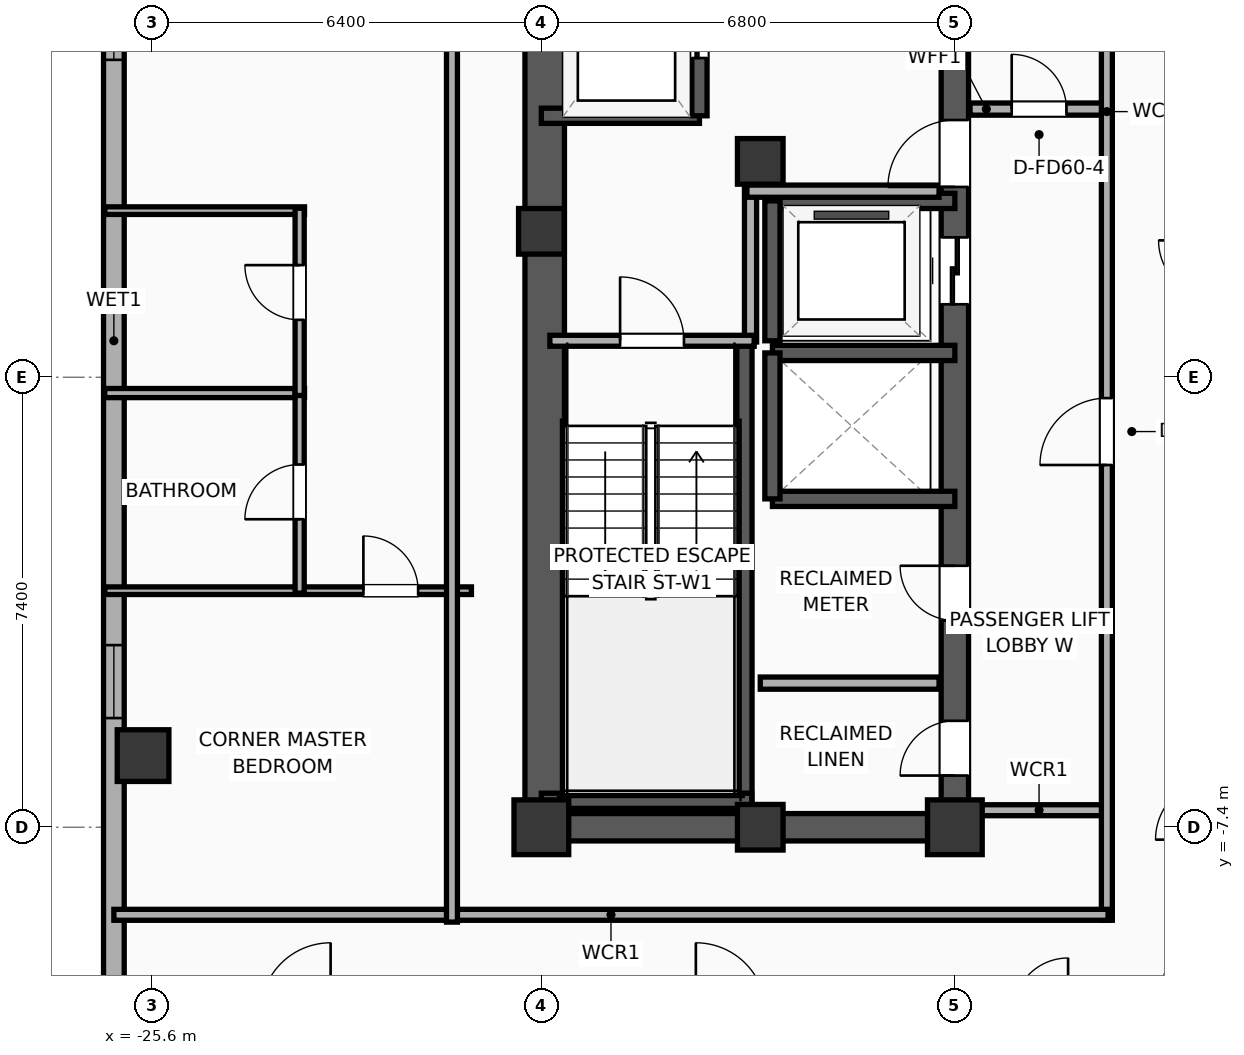
"""IFC4 building model, lengths in metres.
Left out: names, types, materials, properties, quantities, classifications, styles, units other than length and angle.
Written with IfcOpenShell. Run it as: python <this file> out.ifc"""

import sys

from ifc_helpers import new_model, si_unit, direction, frame, frame_2d, origin, origin_2d, place, context, subcontext, project, spatial, rectangle, hollow_rectangle, extrude, element, fill, save


model = new_model("IFC4")
c1 = context("Model", 3, precision=1e-05, world=origin(), true_north=direction((0.0, 1.0)))
c2 = subcontext(c1, "Body", "Model", "MODEL_VIEW")
j1 = project(units=[si_unit("LENGTHUNIT", "METRE"), si_unit("PLANEANGLEUNIT", "RADIAN")], contexts=[c1])
p1 = place(None, origin())
s1 = spatial("IfcSite", under=j1, at=p1, CompositionType="ELEMENT")
p2 = place(p1, origin())
s2 = spatial("IfcBuilding", under=s1, at=p2, CompositionType="ELEMENT")
p3 = place(p2, frame((0.0, 0.0, 204.1)))
s3 = spatial("IfcBuildingStorey", under=s2, at=p3, CompositionType="ELEMENT", Elevation=204.1)
p4 = place(p3, frame((-19.2, -7.4, 0.0), z_axis=(0.0, 0.0, 1.0), x_axis=(1.0, 0.0, 0.0)))
e1 = element("IfcColumn", 1, at=p4, inside=s3, PredefinedType="COLUMN", context=c2, shape_type="SweptSolid", body=[
    extrude(rectangle(XDim=0.9, YDim=0.9, at=origin_2d()), origin(), (0.0, 0.0, 1.0), 3.9),
])
for number, where, z_axis, x_axis in (
    (2, (-19.2, 2.4, 0.0), (0.0, 0.0, 1.0), (1.0, 0.0, 0.0)),
    (3, (-15.6, -7.4, 0.0), (0.0, 0.0, 1.0), (1.0, 0.0, 0.0)),
):
    element("IfcColumn", number, at=place(p3, frame(where, z_axis=z_axis, x_axis=x_axis)), inside=s3, PredefinedType="COLUMN", context=c2, shape_type="SweptSolid", body=[
        extrude(rectangle(XDim=0.75, YDim=0.75, at=origin_2d()), origin(), (0.0, 0.0, 1.0), 3.9),
    ])
p5 = place(p3, frame((-12.4, -7.4, 0.0), z_axis=(0.0, 0.0, 1.0), x_axis=(1.0, 0.0, 0.0)))
e4 = element("IfcColumn", 4, at=p5, inside=s3, PredefinedType="COLUMN", context=c2, shape_type="SweptSolid", body=[
    extrude(rectangle(XDim=0.9, YDim=0.9, at=origin_2d()), origin(), (0.0, 0.0, 1.0), 3.9),
])
p6 = place(p3, frame((-15.6, 3.55, 0.0), z_axis=(0.0, 0.0, 1.0), x_axis=(1.0, 0.0, 0.0)))
e5 = element("IfcColumn", 5, at=p6, inside=s3, PredefinedType="COLUMN", context=c2, shape_type="SweptSolid", body=[
    extrude(rectangle(XDim=0.75, YDim=0.75, at=origin_2d()), origin(), (0.0, 0.0, 1.0), 3.9),
])
p7 = place(p3, frame((-19.425, -7.4, 0.0), z_axis=(0.0, 0.0, 1.0), x_axis=(1.0, 0.0, 0.0)))
e6 = element("IfcWall", 6, at=p7, inside=s3, PredefinedType="SHEAR", context=c2, shape_type="SweptSolid", body=[
    extrude(rectangle(XDim=7.25, YDim=0.45, at=frame_2d((3.625, 0.0))), origin(), (0.0, 0.0, 1.0), 3.65),
])
p8 = place(p3, frame((-19.145, -7.4, 0.0), z_axis=(0.0, 0.0, 1.0), x_axis=(0.0, 1.0, 0.0)))
e7 = element("IfcWall", 7, at=p8, inside=s3, PredefinedType="SHEAR", context=c2, shape_type="SweptSolid", body=[
    extrude(rectangle(XDim=14.8, YDim=0.65, at=frame_2d((7.4, 0.0))), origin(), (0.0, 0.0, 1.0), 3.65),
])
p9 = place(p3, frame((-12.4, -7.4, 0.0), z_axis=(0.0, 0.0, 1.0), x_axis=(0.0, 1.0, 0.0)))
e8 = element("IfcWall", 8, at=p9, inside=s3, PredefinedType="SHEAR", context=c2, shape_type="SweptSolid", body=[
    extrude(rectangle(XDim=14.8, YDim=0.45, at=frame_2d((7.4, 0.0))), origin(), (0.0, 0.0, 1.0), 3.65),
])
p10 = place(p9, frame((8.6, 0.0, 0.0)))
e9 = element("IfcOpeningElement", 9, at=p10, cuts=e8, PredefinedType="OPENING", context=c2, shape_type="SweptSolid", body=[
    extrude(rectangle(XDim=1.1, YDim=2.05, at=frame_2d((0.55, 1.025))), frame((0.0, 0.235, 0.0), z_axis=(0.0, -1.0, 0.0), x_axis=(1.0, 0.0, 0.0)), (0.0, 0.0, 1.0), 0.47),
])
p11 = place(p9, frame((10.53, 0.0, 0.0)))
e10 = element("IfcOpeningElement", 10, at=p11, cuts=e8, PredefinedType="OPENING", context=c2, shape_type="SweptSolid", body=[
    extrude(rectangle(XDim=1.1, YDim=2.05, at=frame_2d((0.55, 1.025))), frame((0.0, 0.235, 0.0), z_axis=(0.0, -1.0, 0.0), x_axis=(1.0, 0.0, 0.0)), (0.0, 0.0, 1.0), 0.47),
])
p12 = place(p9, frame((0.85, 0.0, 0.0)))
e11 = element("IfcOpeningElement", 11, at=p12, cuts=e8, PredefinedType="OPENING", context=c2, shape_type="SweptSolid", body=[
    extrude(rectangle(XDim=0.9, YDim=2.05, at=frame_2d((0.45, 1.025))), frame((0.0, 0.235, 0.0), z_axis=(0.0, -1.0, 0.0), x_axis=(1.0, 0.0, 0.0)), (0.0, 0.0, 1.0), 0.47),
])
p13 = place(p9, frame((3.4, 0.0, 0.0)))
e12 = element("IfcOpeningElement", 12, at=p13, cuts=e8, PredefinedType="OPENING", context=c2, shape_type="SweptSolid", body=[
    extrude(rectangle(XDim=0.9, YDim=2.05, at=frame_2d((0.45, 1.025))), frame((0.0, 0.235, 0.0), z_axis=(0.0, -1.0, 0.0), x_axis=(1.0, 0.0, 0.0)), (0.0, 0.0, 1.0), 0.47),
])
p14 = place(p3, frame((-15.86, -7.085, 0.0), z_axis=(0.0, 0.0, 1.0), x_axis=(0.0, 1.0, 0.0)))
e13 = element("IfcWall", 13, at=p14, inside=s3, PredefinedType="SOLIDWALL", context=c2, shape_type="SweptSolid", body=[
    extrude(rectangle(XDim=7.685, YDim=0.25, at=frame_2d((3.843, 0.0))), origin(), (0.0, 0.0, 1.0), 3.65),
])
p15 = place(p3, frame((-19.2, -6.965, 0.0), z_axis=(0.0, 0.0, 1.0), x_axis=(1.0, 0.0, 0.0)))
e14 = element("IfcWall", 14, at=p15, inside=s3, PredefinedType="SOLIDWALL", context=c2, shape_type="SweptSolid", body=[
    extrude(rectangle(XDim=3.46, YDim=0.25, at=frame_2d((1.73, 0.0))), origin(), (0.0, 0.0, 1.0), 3.65),
])
p16 = place(p3, frame((-25.75, -6.222, 0.0), z_axis=(0.0, 0.0, 1.0), x_axis=(1.0, 0.0, 0.0)))
e15 = element("IfcColumn", 15, at=p16, inside=s3, PredefinedType="COLUMN", context=c2, shape_type="SweptSolid", body=[
    extrude(hollow_rectangle(XDim=0.85, YDim=0.85, WallThickness=0.028, at=origin_2d()), origin(), (0.0, 0.0, 1.0), 3.9),
])
p17 = place(p3, frame((-26.23, -15.383, 0.0), z_axis=(0.0, 0.0, 1.0), x_axis=(0.0, 1.0, 0.0)))
e16 = element("IfcWall", 16, at=p17, inside=s3, PredefinedType="ELEMENTEDWALL", context=c2, shape_type="SweptSolid", body=[
    extrude(rectangle(XDim=31.967, YDim=0.34, at=frame_2d((15.983, 0.0))), origin(), (0.0, 0.0, 1.0), 3.65),
])
p18 = place(p17, frame((29.431, 0.0, 0.75)))
e17 = element("IfcOpeningElement", 17, at=p18, cuts=e16, PredefinedType="OPENING", context=c2, shape_type="SweptSolid", body=[
    extrude(rectangle(XDim=1.2, YDim=2.05, at=frame_2d((0.6, 1.025))), frame((0.0, 0.18, 0.0), z_axis=(0.0, -1.0, 0.0), x_axis=(1.0, 0.0, 0.0)), (0.0, 0.0, 1.0), 0.36),
])
p19 = place(p17, frame((20.603, 0.0, 0.75)))
e18 = element("IfcOpeningElement", 18, at=p19, cuts=e16, PredefinedType="OPENING", context=c2, shape_type="SweptSolid", body=[
    extrude(rectangle(XDim=1.2, YDim=2.05, at=frame_2d((0.6, 1.025))), frame((0.0, 0.18, 0.0), z_axis=(0.0, -1.0, 0.0), x_axis=(1.0, 0.0, 0.0)), (0.0, 0.0, 1.0), 0.36),
])
p20 = place(p17, frame((9.778, 0.0, 0.75)))
e19 = element("IfcOpeningElement", 19, at=p20, cuts=e16, PredefinedType="OPENING", context=c2, shape_type="SweptSolid", body=[
    extrude(rectangle(XDim=1.2, YDim=2.05, at=frame_2d((0.6, 1.025))), frame((0.0, 0.18, 0.0), z_axis=(0.0, -1.0, 0.0), x_axis=(1.0, 0.0, 0.0)), (0.0, 0.0, 1.0), 0.36),
])
p21 = place(p3, frame((-19.2, 4.3, 0.0), z_axis=(0.0, 0.0, 1.0), x_axis=(1.0, 0.0, 0.0)))
e20 = element("IfcWall", 20, at=p21, inside=s3, PredefinedType="SOLIDWALL", context=c2, shape_type="SweptSolid", body=[
    extrude(rectangle(XDim=2.6, YDim=0.25, at=frame_2d((1.3, 0.0))), origin(), (0.0, 0.0, 1.0), 3.65),
])
p22 = place(p3, frame((-16.6, 4.3, 0.0), z_axis=(0.0, 0.0, 1.0), x_axis=(0.0, 1.0, 0.0)))
e21 = element("IfcWall", 21, at=p22, inside=s3, PredefinedType="SOLIDWALL", context=c2, shape_type="SweptSolid", body=[
    extrude(rectangle(XDim=3.1, YDim=0.25, at=frame_2d((1.55, 0.0))), origin(), (0.0, 0.0, 1.0), 3.65),
])
p23 = place(p22, frame((0.95, 0.0, 0.0)))
e22 = element("IfcOpeningElement", 22, at=p23, cuts=e21, PredefinedType="OPENING", context=c2, shape_type="SweptSolid", body=[
    extrude(rectangle(XDim=1.2, YDim=2.05, at=frame_2d((0.6, 1.025))), frame((0.0, 0.135, 0.0), z_axis=(0.0, -1.0, 0.0), x_axis=(1.0, 0.0, 0.0)), (0.0, 0.0, 1.0), 0.27),
])
for number, where, z_axis, x_axis in (
    (23, (-15.4, -2.0, 0.0), (0.0, 0.0, 1.0), (1.0, 0.0, 0.0)),
    (24, (-12.4, 0.4, 0.0), (0.0, 0.0, 1.0), (-1.0, 0.0, 0.0)),
):
    element("IfcWall", number, at=place(p3, frame(where, z_axis=z_axis, x_axis=x_axis)), inside=s3, PredefinedType="SOLIDWALL", context=c2, shape_type="SweptSolid", body=[
        extrude(rectangle(XDim=3.0, YDim=0.25, at=frame_2d((1.5, 0.0))), origin(), (0.0, 0.0, 1.0), 3.65),
    ])
p24 = place(p3, frame((-15.4, 0.4, 0.0), z_axis=(0.0, 0.0, 1.0), x_axis=(0.0, -1.0, 0.0)))
e25 = element("IfcWall", 25, at=p24, inside=s3, PredefinedType="SOLIDWALL", context=c2, shape_type="SweptSolid", body=[
    extrude(rectangle(XDim=2.4, YDim=0.25, at=frame_2d((1.2, 0.0))), origin(), (0.0, 0.0, 1.0), 3.65),
])
p25 = place(p3, frame((-12.4, 2.9, 0.0), z_axis=(0.0, 0.0, 1.0), x_axis=(-1.0, 0.0, 0.0)))
e26 = element("IfcWall", 26, at=p25, inside=s3, PredefinedType="SOLIDWALL", context=c2, shape_type="SweptSolid", body=[
    extrude(rectangle(XDim=3.0, YDim=0.25, at=frame_2d((1.5, 0.0))), origin(), (0.0, 0.0, 1.0), 3.65),
])
p26 = place(p3, frame((-15.4, 2.9, 0.0), z_axis=(0.0, 0.0, 1.0), x_axis=(0.0, -1.0, 0.0)))
e27 = element("IfcWall", 27, at=p26, inside=s3, PredefinedType="SOLIDWALL", context=c2, shape_type="SweptSolid", body=[
    extrude(rectangle(XDim=2.3, YDim=0.25, at=frame_2d((1.15, 0.0))), origin(), (0.0, 0.0, 1.0), 3.65),
])
p27 = place(p3, frame((-15.76, 0.58, 0.0), z_axis=(0.0, 0.0, 1.0), x_axis=(0.0, 1.0, 0.0)))
e28 = element("IfcWall", 28, at=p27, inside=s3, PredefinedType="PARTITIONING", context=c2, shape_type="SweptSolid", body=[
    extrude(rectangle(XDim=2.52, YDim=0.2, at=frame_2d((1.26, 0.0))), origin(), (0.0, 0.0, 1.0), 3.65),
])
p28 = place(p3, frame((-15.82, 3.06, 0.0), z_axis=(0.0, 0.0, 1.0), x_axis=(1.0, 0.0, 0.0)))
e29 = element("IfcWall", 29, at=p28, inside=s3, PredefinedType="PARTITIONING", context=c2, shape_type="SweptSolid", body=[
    extrude(rectangle(XDim=3.16, YDim=0.2, at=frame_2d((1.58, 0.0))), origin(), (0.0, 0.0, 1.0), 3.65),
])
p29 = place(p3, frame((-19.06, 0.6, 0.0), z_axis=(0.0, 0.0, 1.0), x_axis=(1.0, 0.0, 0.0)))
e30 = element("IfcWall", 30, at=p29, inside=s3, PredefinedType="PARTITIONING", context=c2, shape_type="SweptSolid", body=[
    extrude(rectangle(XDim=3.36, YDim=0.18, at=frame_2d((1.68, 0.0))), origin(), (0.0, 0.0, 1.0), 3.65),
])
p30 = place(p29, frame((1.155, 0.0, 0.0)))
e31 = element("IfcOpeningElement", 31, at=p30, cuts=e30, PredefinedType="OPENING", context=c2, shape_type="SweptSolid", body=[
    extrude(rectangle(XDim=1.05, YDim=2.05, at=frame_2d((0.525, 1.025))), frame((0.0, 0.1, 0.0), z_axis=(0.0, -1.0, 0.0), x_axis=(1.0, 0.0, 0.0)), (0.0, 0.0, 1.0), 0.2),
])
p31 = place(p3, frame((-15.6, -5.03, 0.0), z_axis=(0.0, 0.0, 1.0), x_axis=(1.0, 0.0, 0.0)))
e32 = element("IfcWall", 32, at=p31, inside=s3, PredefinedType="PARTITIONING", context=c2, shape_type="SweptSolid", body=[
    extrude(rectangle(XDim=2.94, YDim=0.2, at=frame_2d((1.47, 0.0))), origin(), (0.0, 0.0, 1.0), 3.65),
])
p32 = place(p3, frame((-12.15, 4.41, 0.0), z_axis=(0.0, 0.0, 1.0), x_axis=(1.0, 0.0, 0.0)))
e33 = element("IfcWall", 33, at=p32, inside=s3, PredefinedType="PARTITIONING", context=c2, shape_type="SweptSolid", body=[
    extrude(rectangle(XDim=2.27, YDim=0.2, at=frame_2d((1.135, 0.0))), origin(), (0.0, 0.0, 1.0), 3.65),
])
p33 = place(p32, frame((0.685, 0.0, 0.0)))
e34 = element("IfcOpeningElement", 34, at=p33, cuts=e33, PredefinedType="OPENING", context=c2, shape_type="SweptSolid", body=[
    extrude(rectangle(XDim=0.9, YDim=2.05, at=frame_2d((0.45, 1.025))), frame((0.0, 0.11, 0.0), z_axis=(0.0, -1.0, 0.0), x_axis=(1.0, 0.0, 0.0)), (0.0, 0.0, 1.0), 0.22),
])
p34 = place(p3, frame((-12.15, -7.12, 0.0), z_axis=(0.0, 0.0, 1.0), x_axis=(1.0, 0.0, 0.0)))
e35 = element("IfcWall", 35, at=p34, inside=s3, PredefinedType="PARTITIONING", context=c2, shape_type="SweptSolid", body=[
    extrude(rectangle(XDim=2.27, YDim=0.18, at=frame_2d((1.135, 0.0))), origin(), (0.0, 0.0, 1.0), 3.65),
])
p35 = place(p3, frame((-9.9, -8.93, 0.0), z_axis=(0.0, 0.0, 1.0), x_axis=(0.0, 1.0, 0.0)))
e36 = element("IfcWall", 36, at=p35, inside=s3, PredefinedType="PARTITIONING", context=c2, shape_type="SweptSolid", body=[
    extrude(rectangle(XDim=17.86, YDim=0.18, at=frame_2d((8.93, 0.0))), origin(), (0.0, 0.0, 1.0), 3.65),
])
p36 = place(p35, frame((7.487, 0.0, 0.0)))
e37 = element("IfcOpeningElement", 37, at=p36, cuts=e36, PredefinedType="OPENING", context=c2, shape_type="SweptSolid", body=[
    extrude(rectangle(XDim=1.1, YDim=2.05, at=frame_2d((0.55, 1.025))), frame((0.0, 0.1, 0.0), z_axis=(0.0, -1.0, 0.0), x_axis=(1.0, 0.0, 0.0)), (0.0, 0.0, 1.0), 0.2),
])
p37 = place(p3, frame((-26.23, -8.84, 0.0), z_axis=(0.0, 0.0, 1.0), x_axis=(1.0, 0.0, 0.0)))
e38 = element("IfcWall", 38, at=p37, inside=s3, PredefinedType="PARTITIONING", context=c2, shape_type="SweptSolid", body=[
    extrude(rectangle(XDim=16.35, YDim=0.18, at=frame_2d((8.175, 0.0))), origin(), (0.0, 0.0, 1.0), 3.65),
])
p38 = place(p3, frame((-26.38, 2.74, 0.0), z_axis=(0.0, 0.0, 1.0), x_axis=(1.0, 0.0, 0.0)))
e39 = element("IfcWall", 39, at=p38, inside=s3, PredefinedType="PARTITIONING", context=c2, shape_type="SweptSolid", body=[
    extrude(rectangle(XDim=3.285, YDim=0.125, at=frame_2d((1.643, 0.0))), origin(), (0.0, 0.0, 1.0), 3.65),
])
p39 = place(p3, frame((-26.38, -0.26, 0.0), z_axis=(0.0, 0.0, 1.0), x_axis=(1.0, 0.0, 0.0)))
e40 = element("IfcWall", 40, at=p39, inside=s3, PredefinedType="PLUMBINGWALL", context=c2, shape_type="SweptSolid", body=[
    extrude(rectangle(XDim=3.285, YDim=0.15, at=frame_2d((1.643, 0.0))), origin(), (0.0, 0.0, 1.0), 3.65),
])
p40 = place(p3, frame((-26.38, -3.51, 0.0), z_axis=(0.0, 0.0, 1.0), x_axis=(1.0, 0.0, 0.0)))
e41 = element("IfcWall", 41, at=p40, inside=s3, PredefinedType="PARTITIONING", context=c2, shape_type="SweptSolid", body=[
    extrude(rectangle(XDim=6.03, YDim=0.125, at=frame_2d((3.015, 0.0))), origin(), (0.0, 0.0, 1.0), 3.65),
])
p41 = place(p40, frame((4.253, 0.0, 0.0)))
e42 = element("IfcOpeningElement", 42, at=p41, cuts=e41, PredefinedType="OPENING", context=c2, shape_type="SweptSolid", body=[
    extrude(rectangle(XDim=0.9, YDim=2.05, at=frame_2d((0.45, 1.025))), frame((0.0, 0.073, 0.0), z_axis=(0.0, -1.0, 0.0), x_axis=(1.0, 0.0, 0.0)), (0.0, 0.0, 1.0), 0.145),
])
p42 = place(p3, frame((-23.175, -3.55, 0.0), z_axis=(0.0, 0.0, 1.0), x_axis=(0.0, 1.0, 0.0)))
e43 = element("IfcWall", 43, at=p42, inside=s3, PredefinedType="PLUMBINGWALL", context=c2, shape_type="SweptSolid", body=[
    extrude(rectangle(XDim=3.33, YDim=0.15, at=frame_2d((1.665, 0.0))), origin(), (0.0, 0.0, 1.0), 3.65),
])
p43 = place(p42, frame((1.215, 0.0, 0.0)))
e44 = element("IfcOpeningElement", 44, at=p43, cuts=e43, PredefinedType="OPENING", context=c2, shape_type="SweptSolid", body=[
    extrude(rectangle(XDim=0.9, YDim=2.05, at=frame_2d((0.45, 1.025))), frame((0.0, 0.085, 0.0), z_axis=(0.0, -1.0, 0.0), x_axis=(1.0, 0.0, 0.0)), (0.0, 0.0, 1.0), 0.17),
])
p44 = place(p3, frame((-23.175, -0.3, 0.0), z_axis=(0.0, 0.0, 1.0), x_axis=(0.0, 1.0, 0.0)))
e45 = element("IfcWall", 45, at=p44, inside=s3, PredefinedType="PLUMBINGWALL", context=c2, shape_type="SweptSolid", body=[
    extrude(rectangle(XDim=3.08, YDim=0.15, at=frame_2d((1.54, 0.0))), origin(), (0.0, 0.0, 1.0), 3.65),
])
p45 = place(p44, frame((1.244, 0.0, 0.0)))
e46 = element("IfcOpeningElement", 46, at=p45, cuts=e45, PredefinedType="OPENING", context=c2, shape_type="SweptSolid", body=[
    extrude(rectangle(XDim=0.9, YDim=2.05, at=frame_2d((0.45, 1.025))), frame((0.0, 0.085, 0.0), z_axis=(0.0, -1.0, 0.0), x_axis=(1.0, 0.0, 0.0)), (0.0, 0.0, 1.0), 0.17),
])
p46 = place(p3, frame((-20.67, -8.96, 0.0), z_axis=(0.0, 0.0, 1.0), x_axis=(0.0, 1.0, 0.0)))
e47 = element("IfcWall", 47, at=p46, inside=s3, PredefinedType="PARTITIONING", context=c2, shape_type="SweptSolid", body=[
    extrude(rectangle(XDim=17.92, YDim=0.18, at=frame_2d((8.96, 0.0))), origin(), (0.0, 0.0, 1.0), 3.65),
])
p47 = place(p19, origin())
e48 = element("IfcWindow", 48, at=p47, inside=s3, PartitioningType="SINGLE_PANEL", PredefinedType="WINDOW", context=c2, shape_type="SweptSolid", body=[
    extrude(rectangle(XDim=1.2, YDim=2.05, at=frame_2d((0.6, 1.025))), frame((0.0, 0.03, 0.0), z_axis=(0.0, -1.0, 0.0), x_axis=(1.0, 0.0, 0.0)), (0.0, 0.0, 1.0), 0.06),
])
fill(e18, e48)
p48 = place(p20, origin())
e49 = element("IfcWindow", 49, at=p48, inside=s3, PartitioningType="SINGLE_PANEL", PredefinedType="WINDOW", context=c2, shape_type="SweptSolid", body=[
    extrude(rectangle(XDim=1.2, YDim=2.05, at=frame_2d((0.6, 1.025))), frame((0.0, 0.03, 0.0), z_axis=(0.0, -1.0, 0.0), x_axis=(1.0, 0.0, 0.0)), (0.0, 0.0, 1.0), 0.06),
])
fill(e19, e49)
p49 = place(p23, origin())
e50 = element("IfcDoor", 50, at=p49, inside=s3, OperationType="SLIDING_TO_LEFT", PredefinedType="DOOR", context=c2, shape_type="SweptSolid", body=[
    extrude(rectangle(XDim=1.2, YDim=2.05, at=frame_2d((0.6, 1.025))), frame((0.0, 0.025, 0.0), z_axis=(0.0, -1.0, 0.0), x_axis=(1.0, 0.0, 0.0)), (0.0, 0.0, 1.0), 0.05),
])
fill(e22, e50)
p50 = place(p10, origin())
e51 = element("IfcDoor", 51, at=p50, inside=s3, OperationType="SLIDING_TO_LEFT", PredefinedType="DOOR", context=c2, shape_type="SweptSolid", body=[
    extrude(rectangle(XDim=1.1, YDim=2.05, at=frame_2d((0.55, 1.025))), frame((0.0, 0.025, 0.0), z_axis=(0.0, -1.0, 0.0), x_axis=(1.0, 0.0, 0.0)), (0.0, 0.0, 1.0), 0.05),
])
fill(e9, e51)
p51 = place(p30, origin())
e52 = element("IfcDoor", 52, at=p51, inside=s3, OperationType="SINGLE_SWING_LEFT", PredefinedType="DOOR", context=c2, shape_type="SweptSolid", body=[
    extrude(rectangle(XDim=1.05, YDim=2.05, at=frame_2d((0.525, 1.025))), frame((0.0, 0.025, 0.0), z_axis=(0.0, -1.0, 0.0), x_axis=(1.0, 0.0, 0.0)), (0.0, 0.0, 1.0), 0.05),
])
fill(e31, e52)
p52 = place(p33, origin())
e53 = element("IfcDoor", 53, at=p52, inside=s3, OperationType="SINGLE_SWING_LEFT", PredefinedType="DOOR", context=c2, shape_type="SweptSolid", body=[
    extrude(rectangle(XDim=0.9, YDim=2.05, at=frame_2d((0.45, 1.025))), frame((0.0, 0.025, 0.0), z_axis=(0.0, -1.0, 0.0), x_axis=(1.0, 0.0, 0.0)), (0.0, 0.0, 1.0), 0.05),
])
fill(e34, e53)
p53 = place(p36, origin())
e54 = element("IfcDoor", 54, at=p53, inside=s3, OperationType="SINGLE_SWING_LEFT", PredefinedType="DOOR", context=c2, shape_type="SweptSolid", body=[
    extrude(rectangle(XDim=1.1, YDim=2.05, at=frame_2d((0.55, 1.025))), frame((0.0, 0.025, 0.0), z_axis=(0.0, -1.0, 0.0), x_axis=(1.0, 0.0, 0.0)), (0.0, 0.0, 1.0), 0.05),
])
fill(e37, e54)
p54 = place(p41, origin())
e55 = element("IfcDoor", 55, at=p54, inside=s3, OperationType="SINGLE_SWING_LEFT", PredefinedType="DOOR", context=c2, shape_type="SweptSolid", body=[
    extrude(rectangle(XDim=0.9, YDim=2.05, at=frame_2d((0.45, 1.025))), frame((0.0, 0.025, 0.0), z_axis=(0.0, -1.0, 0.0), x_axis=(1.0, 0.0, 0.0)), (0.0, 0.0, 1.0), 0.05),
])
fill(e42, e55)
p55 = place(p43, origin())
e56 = element("IfcDoor", 56, at=p55, inside=s3, OperationType="SINGLE_SWING_LEFT", PredefinedType="DOOR", context=c2, shape_type="SweptSolid", body=[
    extrude(rectangle(XDim=0.9, YDim=2.05, at=frame_2d((0.45, 1.025))), frame((0.0, 0.025, 0.0), z_axis=(0.0, -1.0, 0.0), x_axis=(1.0, 0.0, 0.0)), (0.0, 0.0, 1.0), 0.05),
])
fill(e44, e56)
p56 = place(p45, origin())
e57 = element("IfcDoor", 57, at=p56, inside=s3, OperationType="SINGLE_SWING_RIGHT", PredefinedType="DOOR", context=c2, shape_type="SweptSolid", body=[
    extrude(rectangle(XDim=0.9, YDim=2.05, at=frame_2d((0.45, 1.025))), frame((0.0, 0.025, 0.0), z_axis=(0.0, -1.0, 0.0), x_axis=(1.0, 0.0, 0.0)), (0.0, 0.0, 1.0), 0.05),
])
fill(e46, e57)
p57 = place(p11, origin())
e58 = element("IfcDoor", 58, at=p57, inside=s3, OperationType="SINGLE_SWING_LEFT", PredefinedType="DOOR", context=c2, shape_type="SweptSolid", body=[
    extrude(rectangle(XDim=1.1, YDim=2.05, at=frame_2d((0.55, 1.025))), frame((0.0, 0.025, 0.0), z_axis=(0.0, -1.0, 0.0), x_axis=(1.0, 0.0, 0.0)), (0.0, 0.0, 1.0), 0.05),
])
fill(e10, e58)
p58 = place(p12, origin())
e59 = element("IfcDoor", 59, at=p58, inside=s3, OperationType="SINGLE_SWING_LEFT", PredefinedType="DOOR", context=c2, shape_type="SweptSolid", body=[
    extrude(rectangle(XDim=0.9, YDim=2.05, at=frame_2d((0.45, 1.025))), frame((0.0, 0.025, 0.0), z_axis=(0.0, -1.0, 0.0), x_axis=(1.0, 0.0, 0.0)), (0.0, 0.0, 1.0), 0.05),
])
fill(e11, e59)
p59 = place(p13, origin())
e60 = element("IfcDoor", 60, at=p59, inside=s3, OperationType="SINGLE_SWING_RIGHT", PredefinedType="DOOR", context=c2, shape_type="SweptSolid", body=[
    extrude(rectangle(XDim=0.9, YDim=2.05, at=frame_2d((0.45, 1.025))), frame((0.0, 0.025, 0.0), z_axis=(0.0, -1.0, 0.0), x_axis=(1.0, 0.0, 0.0)), (0.0, 0.0, 1.0), 0.05),
])
fill(e12, e60)
save(model, sys.argv[1])
